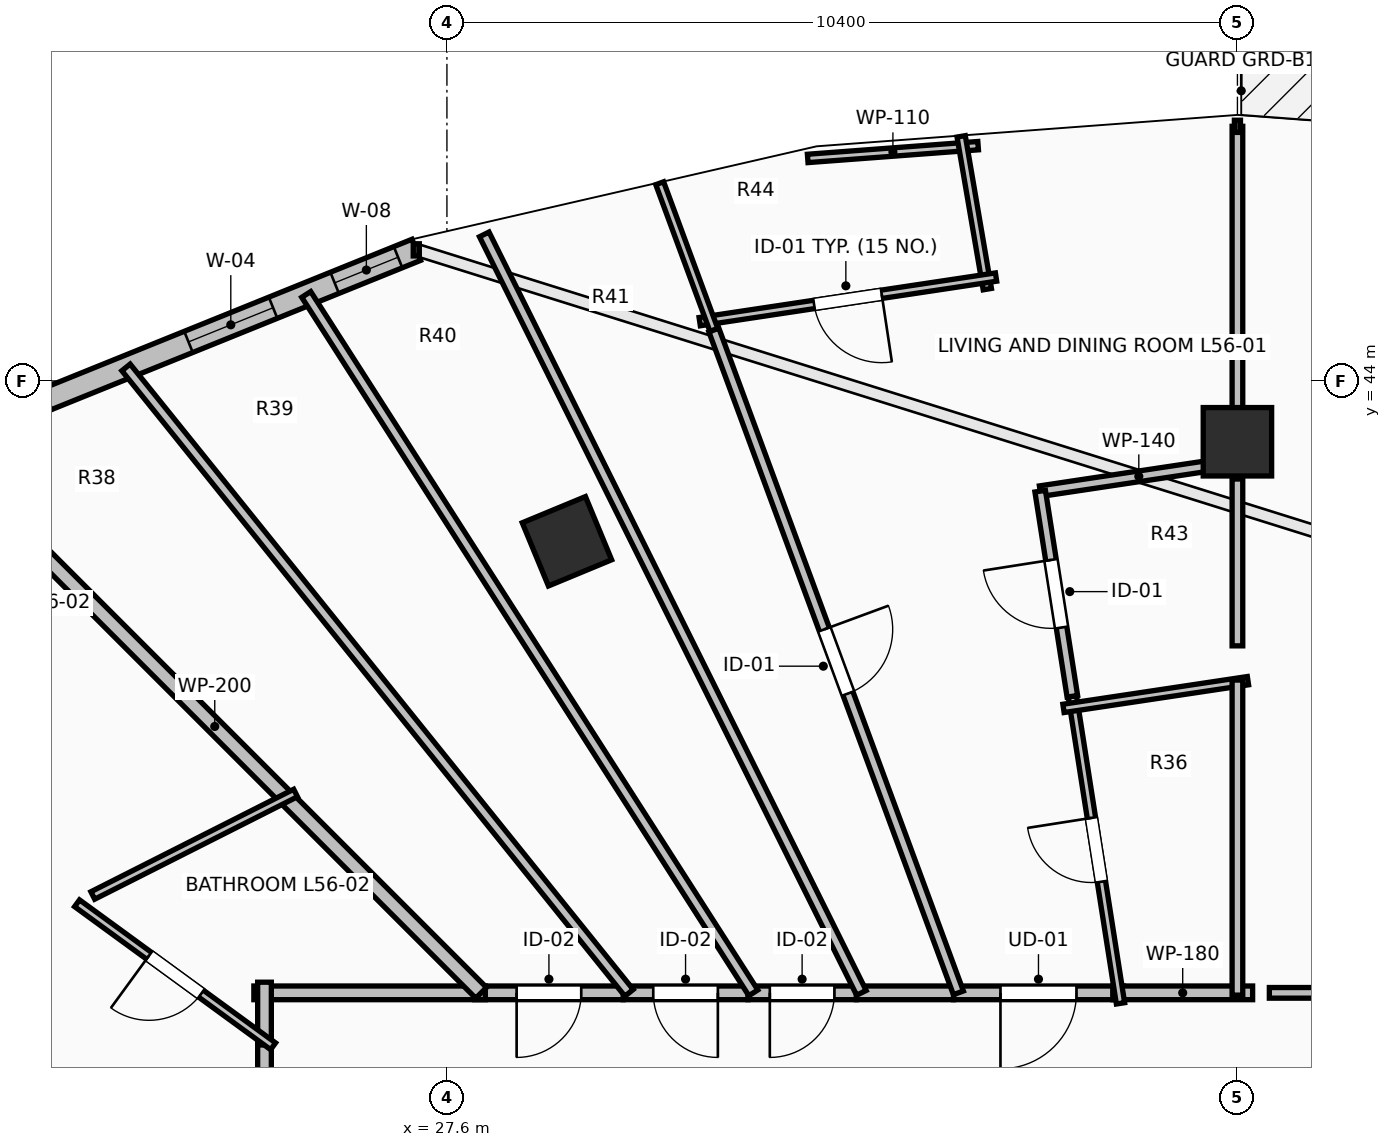
"""IFC4 building model, lengths in metres.
Left out: names, types, materials, properties, quantities, classifications, styles, units other than length and angle.
Written with IfcOpenShell. Run it as: python <this file> out.ifc"""

import sys

from ifc_helpers import new_model, si_unit, direction, frame, frame_2d, origin, origin_2d, place, context, subcontext, project, spatial, rectangle, extrude, element, fill, save


model = new_model("IFC4")
c1 = context("Model", 3, precision=1e-05, world=origin(), true_north=direction((0.0, 1.0)))
c2 = subcontext(c1, "Body", "Model", "MODEL_VIEW")
j1 = project(units=[si_unit("LENGTHUNIT", "METRE"), si_unit("PLANEANGLEUNIT", "RADIAN")], contexts=[c1])
p1 = place(None, origin())
s1 = spatial("IfcSite", under=j1, at=p1, CompositionType="ELEMENT")
p2 = place(p1, origin())
s2 = spatial("IfcBuilding", under=s1, at=p2, CompositionType="ELEMENT")
p3 = place(p2, frame((0.0, 0.0, 207.2)))
s3 = spatial("IfcBuildingStorey", under=s2, at=p3, CompositionType="ELEMENT", Elevation=207.2)
for number, where, z_axis, x_axis in (
    (1, (38.0, 43.2, 0.0), (0.0, 0.0, 1.0), (0.0, 1.0, 0.0)),
    (2, (29.179, 41.891, 0.0), (0.0, 0.0, 1.0), (-0.383, 0.924, 0.0)),
):
    element("IfcColumn", number, at=place(p3, frame(where, z_axis=z_axis, x_axis=x_axis)), inside=s3, PredefinedType="COLUMN", context=c2, shape_type="SweptSolid", body=[
        extrude(rectangle(XDim=0.9, YDim=0.9, at=origin_2d()), origin(), (0.0, 0.0, 1.0), 3.55),
    ])
p4 = place(p3, frame((27.197, 45.725, 0.0), z_axis=(0.0, 0.0, 1.0), x_axis=(-0.927111094334, -0.374786630981, 0.0)))
e3 = element("IfcWall", 3, at=p4, inside=s3, PredefinedType="STANDARD", context=c2, shape_type="SweptSolid", body=[
    extrude(rectangle(XDim=5.264, YDim=0.3, at=frame_2d((2.632, 0.0))), origin(), (0.0, 0.0, 1.0), 3.29),
])
p5 = place(p4, frame((0.258, 0.0, 0.85)))
e4 = element("IfcOpeningElement", 4, at=p5, cuts=e3, PredefinedType="OPENING", context=c2, shape_type="SweptSolid", body=[
    extrude(rectangle(XDim=0.9, YDim=1.8, at=frame_2d((0.45, 0.9))), frame((0.0, 0.165, 0.0), z_axis=(0.0, -1.0, 0.0), x_axis=(1.0, 0.0, 0.0)), (0.0, 0.0, 1.0), 0.33),
])
p6 = place(p4, frame((2.032, 0.0, 0.85)))
e5 = element("IfcOpeningElement", 5, at=p6, cuts=e3, PredefinedType="OPENING", context=c2, shape_type="SweptSolid", body=[
    extrude(rectangle(XDim=1.2, YDim=1.95, at=frame_2d((0.6, 0.975))), frame((0.0, 0.165, 0.0), z_axis=(0.0, -1.0, 0.0), x_axis=(1.0, 0.0, 0.0)), (0.0, 0.0, 1.0), 0.33),
])
p7 = place(p3, frame((36.5, 35.95, 0.0), z_axis=(0.0, 0.0, 1.0), x_axis=(-1.0, 0.0, 0.0)))
e6 = element("IfcWall", 6, at=p7, inside=s3, PredefinedType="PARTITIONING", context=c2, shape_type="SweptSolid", body=[
    extrude(rectangle(XDim=2.235, YDim=0.18, at=frame_2d((1.118, 0.0))), origin(), (0.0, 0.0, 1.0), 3.29),
])
p8 = place(p7, frame((0.617, 0.0, 0.0)))
e7 = element("IfcOpeningElement", 7, at=p8, cuts=e6, PredefinedType="OPENING", context=c2, shape_type="SweptSolid", body=[
    extrude(rectangle(XDim=1.0, YDim=2.15, at=frame_2d((0.5, 1.075))), frame((0.0, 0.105, 0.0), z_axis=(0.0, -1.0, 0.0), x_axis=(1.0, 0.0, 0.0)), (0.0, 0.0, 1.0), 0.21),
])
p9 = place(p3, frame((38.2, 35.95, 0.0), z_axis=(0.0, 0.0, 1.0), x_axis=(-1.0, 0.0, 0.0)))
e8 = element("IfcWall", 8, at=p9, inside=s3, PredefinedType="PARTITIONING", context=c2, shape_type="SweptSolid", body=[
    extrude(rectangle(XDim=1.84, YDim=0.18, at=frame_2d((0.92, 0.0))), origin(), (0.0, 0.0, 1.0), 3.29),
])
p10 = place(p3, frame((34.265, 35.95, 0.0), z_axis=(0.0, 0.0, 1.0), x_axis=(-1.0, 0.0, 0.0)))
e9 = element("IfcWall", 9, at=p10, inside=s3, PredefinedType="PARTITIONING", context=c2, shape_type="SweptSolid", body=[
    extrude(rectangle(XDim=1.279, YDim=0.18, at=frame_2d((0.639, 0.0))), origin(), (0.0, 0.0, 1.0), 3.29),
])
p11 = place(p3, frame((32.986, 35.95, 0.0), z_axis=(0.0, 0.0, 1.0), x_axis=(-1.0, 0.0, 0.0)))
e10 = element("IfcWall", 10, at=p11, inside=s3, PredefinedType="PARTITIONING", context=c2, shape_type="SweptSolid", body=[
    extrude(rectangle(XDim=1.426, YDim=0.18, at=frame_2d((0.713, 0.0))), origin(), (0.0, 0.0, 1.0), 3.29),
])
p12 = place(p11, frame((0.288, 0.0, 0.0)))
e11 = element("IfcOpeningElement", 11, at=p12, cuts=e10, PredefinedType="OPENING", context=c2, shape_type="SweptSolid", body=[
    extrude(rectangle(XDim=0.85, YDim=2.1, at=frame_2d((0.425, 1.05))), frame((0.0, 0.105, 0.0), z_axis=(0.0, -1.0, 0.0), x_axis=(1.0, 0.0, 0.0)), (0.0, 0.0, 1.0), 0.21),
])
p13 = place(p3, frame((31.56, 35.95, 0.0), z_axis=(0.0, 0.0, 1.0), x_axis=(-1.0, 0.0, 0.0)))
e12 = element("IfcWall", 12, at=p13, inside=s3, PredefinedType="PARTITIONING", context=c2, shape_type="SweptSolid", body=[
    extrude(rectangle(XDim=1.641, YDim=0.18, at=frame_2d((0.821, 0.0))), origin(), (0.0, 0.0, 1.0), 2.482),
])
p14 = place(p13, frame((0.396, 0.0, 0.0)))
e13 = element("IfcOpeningElement", 13, at=p14, cuts=e12, PredefinedType="OPENING", context=c2, shape_type="SweptSolid", body=[
    extrude(rectangle(XDim=0.85, YDim=2.1, at=frame_2d((0.425, 1.05))), frame((0.0, 0.105, 0.0), z_axis=(0.0, -1.0, 0.0), x_axis=(1.0, 0.0, 0.0)), (0.0, 0.0, 1.0), 0.21),
])
p15 = place(p3, frame((29.919, 35.95, 0.0), z_axis=(0.0, 0.0, 1.0), x_axis=(-1.0, 0.0, 0.0)))
e14 = element("IfcWall", 14, at=p15, inside=s3, PredefinedType="PARTITIONING", context=c2, shape_type="SweptSolid", body=[
    extrude(rectangle(XDim=1.954, YDim=0.18, at=frame_2d((0.977, 0.0))), origin(), (0.0, 0.0, 1.0), 2.482),
])
p16 = place(p15, frame((0.552, 0.0, 0.0)))
e15 = element("IfcOpeningElement", 15, at=p16, cuts=e14, PredefinedType="OPENING", context=c2, shape_type="SweptSolid", body=[
    extrude(rectangle(XDim=0.85, YDim=2.1, at=frame_2d((0.425, 1.05))), frame((0.0, 0.105, 0.0), z_axis=(0.0, -1.0, 0.0), x_axis=(1.0, 0.0, 0.0)), (0.0, 0.0, 1.0), 0.21),
])
p17 = place(p3, frame((25.2, 35.404, 0.0), z_axis=(0.0, 0.0, 1.0), x_axis=(0.0, -1.0, 0.0)))
e16 = element("IfcWall", 16, at=p17, inside=s3, PredefinedType="PARTITIONING", context=c2, shape_type="SweptSolid", body=[
    extrude(rectangle(XDim=3.563, YDim=0.18, at=frame_2d((1.781, 0.0))), origin(), (0.0, 0.0, 1.0), 2.482),
])
p18 = place(p17, frame((1.281, 0.0, 0.0)))
e17 = element("IfcOpeningElement", 17, at=p18, cuts=e16, PredefinedType="OPENING", context=c2, shape_type="SweptSolid", body=[
    extrude(rectangle(XDim=1.0, YDim=2.15, at=frame_2d((0.5, 1.075))), frame((0.0, 0.105, 0.0), z_axis=(0.0, -1.0, 0.0), x_axis=(1.0, 0.0, 0.0)), (0.0, 0.0, 1.0), 0.21),
])
p19 = place(p3, frame((28.105, 35.95, 0.0), z_axis=(0.0, 0.0, 1.0), x_axis=(-1.0, 0.0, 0.0)))
e18 = element("IfcWall", 18, at=p19, inside=s3, PredefinedType="PARTITIONING", context=c2, shape_type="SweptSolid", body=[
    extrude(rectangle(XDim=3.045, YDim=0.18, at=frame_2d((1.522, 0.0))), origin(), (0.0, 0.0, 1.0), 2.482),
])
p20 = place(p3, frame((25.2, 36.09, 0.0), z_axis=(0.0, 0.0, 1.0), x_axis=(0.0, -1.0, 0.0)))
e19 = element("IfcWall", 19, at=p20, inside=s3, PredefinedType="PARTITIONING", context=c2, shape_type="SweptSolid", body=[
    extrude(rectangle(XDim=0.826, YDim=0.18, at=frame_2d((0.413, 0.0))), origin(), (0.0, 0.0, 1.0), 2.482),
])
p21 = place(p3, frame((36.462, 35.812, 0.0), z_axis=(0.0, 0.0, 1.0), x_axis=(-0.154883213323, 0.987932786292, 0.0)))
e20 = element("IfcWall", 20, at=p21, inside=s3, PredefinedType="PARTITIONING", context=c2, shape_type="SweptSolid", body=[
    extrude(rectangle(XDim=4.089, YDim=0.11, at=frame_2d((2.044, 0.0))), origin(), (0.0, 0.0, 1.0), 2.936),
])
p22 = place(p21, frame((1.619, 0.0, 0.0)))
e21 = element("IfcOpeningElement", 21, at=p22, cuts=e20, PredefinedType="OPENING", context=c2, shape_type="SweptSolid", body=[
    extrude(rectangle(XDim=0.85, YDim=2.1, at=frame_2d((0.425, 1.05))), frame((0.0, 0.07, 0.0), z_axis=(0.0, -1.0, 0.0), x_axis=(1.0, 0.0, 0.0)), (0.0, 0.0, 1.0), 0.14),
])
p23 = place(p3, frame((34.589, 47.095, 0.0), z_axis=(0.0, 0.0, 1.0), x_axis=(-0.997205784552, -0.074703569226, 0.0)))
e22 = element("IfcWall", 22, at=p23, inside=s3, PredefinedType="PARTITIONING", context=c2, shape_type="SweptSolid", body=[
    extrude(rectangle(XDim=2.249, YDim=0.11, at=frame_2d((1.124, 0.0))), origin(), (0.0, 0.0, 1.0), 3.29),
])
p24 = place(p3, frame((34.365, 47.218, 0.0), z_axis=(0.0, 0.0, 1.0), x_axis=(0.168804313657, -0.985649584635, 0.0)))
e23 = element("IfcWall", 23, at=p24, inside=s3, PredefinedType="PARTITIONING", context=c2, shape_type="SweptSolid", body=[
    extrude(rectangle(XDim=2.039, YDim=0.11, at=frame_2d((1.02, 0.0))), origin(), (0.0, 0.0, 1.0), 3.29),
])
p25 = place(p3, frame((34.824, 45.367, 0.0), z_axis=(0.0, 0.0, 1.0), x_axis=(-0.988877230123, -0.148734070555, 0.0)))
e24 = element("IfcWall", 24, at=p25, inside=s3, PredefinedType="PARTITIONING", context=c2, shape_type="SweptSolid", body=[
    extrude(rectangle(XDim=3.943, YDim=0.11, at=frame_2d((1.971, 0.0))), origin(), (0.0, 0.0, 1.0), 3.29),
])
p26 = place(p25, frame((1.521, 0.0, 0.0)))
e25 = element("IfcOpeningElement", 25, at=p26, cuts=e24, PredefinedType="OPENING", context=c2, shape_type="SweptSolid", body=[
    extrude(rectangle(XDim=0.9, YDim=2.1, at=frame_2d((0.45, 1.05))), frame((0.0, 0.07, 0.0), z_axis=(0.0, -1.0, 0.0), x_axis=(1.0, 0.0, 0.0)), (0.0, 0.0, 1.0), 0.14),
])
p27 = place(p3, frame((31.113, 44.67, 0.0), z_axis=(0.0, 0.0, 1.0), x_axis=(-0.346337161188, 0.938110105894, 0.0)))
e26 = element("IfcWall", 26, at=p27, inside=s3, PredefinedType="PARTITIONING", context=c2, shape_type="SweptSolid", body=[
    extrude(rectangle(XDim=2.059, YDim=0.11, at=frame_2d((1.03, 0.0))), origin(), (0.0, 0.0, 1.0), 3.29),
])
p28 = place(p3, frame((35.405, 42.55, 0.0), z_axis=(0.0, 0.0, 1.0), x_axis=(0.988900154693, 0.148581573718, 0.0)))
e27 = element("IfcWall", 27, at=p28, inside=s3, PredefinedType="PARTITIONING", context=c2, shape_type="SweptSolid", body=[
    extrude(rectangle(XDim=2.624, YDim=0.14, at=frame_2d((1.312, 0.0))), origin(), (0.0, 0.0, 1.0), 2.482),
])
p29 = place(p3, frame((35.828, 39.851, 0.0), z_axis=(0.0, 0.0, 1.0), x_axis=(-0.154971189464, 0.987918989814, 0.0)))
e28 = element("IfcWall", 28, at=p29, inside=s3, PredefinedType="PARTITIONING", context=c2, shape_type="SweptSolid", body=[
    extrude(rectangle(XDim=2.732, YDim=0.14, at=frame_2d((1.366, 0.0))), origin(), (0.0, 0.0, 1.0), 2.482),
])
p30 = place(p29, frame((0.916, 0.0, 0.0)))
e29 = element("IfcOpeningElement", 29, at=p30, cuts=e28, PredefinedType="OPENING", context=c2, shape_type="SweptSolid", body=[
    extrude(rectangle(XDim=0.9, YDim=2.1, at=frame_2d((0.45, 1.05))), frame((0.0, 0.085, 0.0), z_axis=(0.0, -1.0, 0.0), x_axis=(1.0, 0.0, 0.0)), (0.0, 0.0, 1.0), 0.17),
])
p31 = place(p3, frame((31.112, 44.67, 0.0), z_axis=(0.0, 0.0, 1.0), x_axis=(0.346109472243, -0.938194134081, 0.0)))
e30 = element("IfcWall", 30, at=p31, inside=s3, PredefinedType="PARTITIONING", context=c2, shape_type="SweptSolid", body=[
    extrude(rectangle(XDim=9.294, YDim=0.14, at=frame_2d((4.647, 0.0))), origin(), (0.0, 0.0, 1.0), 2.482),
])
p32 = place(p31, frame((4.197, 0.0, 0.0)))
e31 = element("IfcOpeningElement", 31, at=p32, cuts=e30, PredefinedType="OPENING", context=c2, shape_type="SweptSolid", body=[
    extrude(rectangle(XDim=0.9, YDim=2.1, at=frame_2d((0.45, 1.05))), frame((0.0, 0.085, 0.0), z_axis=(0.0, -1.0, 0.0), x_axis=(1.0, 0.0, 0.0)), (0.0, 0.0, 1.0), 0.17),
])
p33 = place(p3, frame((38.138, 40.057, 0.0), z_axis=(0.0, 0.0, 1.0), x_axis=(-0.988892526147, -0.148632337431, 0.0)))
e32 = element("IfcWall", 32, at=p33, inside=s3, PredefinedType="PARTITIONING", context=c2, shape_type="SweptSolid", body=[
    extrude(rectangle(XDim=2.454, YDim=0.11, at=frame_2d((1.227, 0.0))), origin(), (0.0, 0.0, 1.0), 3.022),
])
p34 = place(p3, frame((28.091, 45.928, 0.0), z_axis=(0.0, 0.0, 1.0), x_axis=(0.445267068418, -0.895397809793, 0.0)))
e33 = element("IfcWall", 33, at=p34, inside=s3, PredefinedType="PARTITIONING", context=c2, shape_type="SweptSolid", body=[
    extrude(rectangle(XDim=11.144, YDim=0.14, at=frame_2d((5.572, 0.0))), origin(), (0.0, 0.0, 1.0), 2.482),
])
p35 = place(p3, frame((25.749, 45.138, 0.0), z_axis=(0.0, 0.0, 1.0), x_axis=(0.539168632786, -0.842197830335, 0.0)))
e34 = element("IfcWall", 34, at=p35, inside=s3, PredefinedType="PARTITIONING", context=c2, shape_type="SweptSolid", body=[
    extrude(rectangle(XDim=10.909, YDim=0.14, at=frame_2d((5.455, 0.0))), origin(), (0.0, 0.0, 1.0), 2.482),
])
p36 = place(p3, frame((23.378, 44.178, 0.0), z_axis=(0.0, 0.0, 1.0), x_axis=(0.626756813732, -0.779214923137, 0.0)))
e35 = element("IfcWall", 35, at=p36, inside=s3, PredefinedType="PARTITIONING", context=c2, shape_type="SweptSolid", body=[
    extrude(rectangle(XDim=10.559, YDim=0.14, at=frame_2d((5.28, 0.0))), origin(), (0.0, 0.0, 1.0), 2.482),
])
p37 = place(p3, frame((21.041, 42.959, 0.0), z_axis=(0.0, 0.0, 1.0), x_axis=(0.707106781187, -0.707106781187, 0.0)))
e36 = element("IfcWall", 36, at=p37, inside=s3, PredefinedType="PARTITIONING", context=c2, shape_type="SweptSolid", body=[
    extrude(rectangle(XDim=9.912, YDim=0.2, at=frame_2d((4.956, 0.0))), origin(), (0.0, 0.0, 1.0), 2.482),
])
p38 = place(p3, frame((25.313, 35.248, 0.0), z_axis=(0.0, 0.0, 1.0), x_axis=(-0.807968083988, 0.58922625133, 0.0)))
e37 = element("IfcWall", 37, at=p38, inside=s3, PredefinedType="PARTITIONING", context=c2, shape_type="SweptSolid", body=[
    extrude(rectangle(XDim=3.192, YDim=0.11, at=frame_2d((1.596, 0.0))), origin(), (0.0, 0.0, 1.0), 2.482),
])
p39 = place(p38, frame((1.171, 0.0, 0.0)))
e38 = element("IfcOpeningElement", 38, at=p39, cuts=e37, PredefinedType="OPENING", context=c2, shape_type="SweptSolid", body=[
    extrude(rectangle(XDim=0.85, YDim=2.1, at=frame_2d((0.425, 1.05))), frame((0.0, 0.07, 0.0), z_axis=(0.0, -1.0, 0.0), x_axis=(1.0, 0.0, 0.0)), (0.0, 0.0, 1.0), 0.14),
])
p40 = place(p3, frame((22.941, 37.231, 0.0), z_axis=(0.0, 0.0, 1.0), x_axis=(0.892507731149, 0.451032094024, 0.0)))
e39 = element("IfcWall", 39, at=p40, inside=s3, PredefinedType="PARTITIONING", context=c2, shape_type="SweptSolid", body=[
    extrude(rectangle(XDim=2.989, YDim=0.11, at=frame_2d((1.495, 0.0))), origin(), (0.0, 0.0, 1.0), 2.482),
])
p41 = place(p3, frame((18.152, 35.15, 0.0), z_axis=(0.0, 0.0, 1.0), x_axis=(0.908152637685, -0.418639208227, 0.0)))
e40 = element("IfcWall", 40, at=p41, inside=s3, PredefinedType="PARTITIONING", context=c2, shape_type="SweptSolid", body=[
    extrude(rectangle(XDim=7.761, YDim=0.14, at=frame_2d((3.88, 0.0))), origin(), (0.0, 0.0, 1.0), 2.824),
])
p42 = place(p41, frame((3.43, 0.0, 0.0)))
e41 = element("IfcOpeningElement", 41, at=p42, cuts=e40, PredefinedType="OPENING", context=c2, shape_type="SweptSolid", body=[
    extrude(rectangle(XDim=0.9, YDim=2.1, at=frame_2d((0.45, 1.05))), frame((0.0, 0.085, 0.0), z_axis=(0.0, -1.0, 0.0), x_axis=(1.0, 0.0, 0.0)), (0.0, 0.0, 1.0), 0.17),
])
p43 = place(p3, frame((12.609, 35.141, 0.0), z_axis=(0.0, 0.0, 1.0), x_axis=(0.940877411069, -0.338747246985, 0.0)))
e42 = element("IfcWall", 42, at=p43, inside=s3, PredefinedType="PARTITIONING", context=c2, shape_type="SweptSolid", body=[
    extrude(rectangle(XDim=13.382, YDim=0.14, at=frame_2d((6.691, 0.0))), origin(), (0.0, 0.0, 1.0), 2.824),
])
p44 = place(p43, frame((6.266, 0.0, 0.0)))
e43 = element("IfcOpeningElement", 43, at=p44, cuts=e42, PredefinedType="OPENING", context=c2, shape_type="SweptSolid", body=[
    extrude(rectangle(XDim=0.85, YDim=2.1, at=frame_2d((0.425, 1.05))), frame((0.0, 0.085, 0.0), z_axis=(0.0, -1.0, 0.0), x_axis=(1.0, 0.0, 0.0)), (0.0, 0.0, 1.0), 0.17),
])
p45 = place(p3, frame((47.67, 35.95, 0.0), z_axis=(0.0, 0.0, 1.0), x_axis=(-1.0, 0.0, 0.0)))
e44 = element("IfcWall", 44, at=p45, inside=s3, PredefinedType="PARTITIONING", context=c2, shape_type="SweptSolid", body=[
    extrude(rectangle(XDim=9.25, YDim=0.14, at=frame_2d((4.625, 0.0))), origin(), (0.0, 0.0, 1.0), 2.936),
])
p46 = place(p3, frame((38.0, 43.16, 0.0), z_axis=(0.0, 0.0, 1.0), x_axis=(0.0, 1.0, 0.0)))
e45 = element("IfcWall", 45, at=p46, inside=s3, PredefinedType="PARTITIONING", context=c2, shape_type="SweptSolid", body=[
    extrude(rectangle(XDim=4.19, YDim=0.14, at=frame_2d((2.095, 0.0))), origin(), (0.0, 0.0, 1.0), 3.29),
])
p47 = place(p3, frame((38.0, 35.92, 0.0), z_axis=(0.0, 0.0, 1.0), x_axis=(0.0, 1.0, 0.0)))
e46 = element("IfcWall", 46, at=p47, inside=s3, PredefinedType="PARTITIONING", context=c2, shape_type="SweptSolid", body=[
    extrude(rectangle(XDim=4.145, YDim=0.14, at=frame_2d((2.073, 0.0))), origin(), (0.0, 0.0, 1.0), 2.936),
])
p48 = place(p3, frame((38.0, 40.515, 0.0), z_axis=(0.0, 0.0, 1.0), x_axis=(0.0, 1.0, 0.0)))
e47 = element("IfcWall", 47, at=p48, inside=s3, PredefinedType="PARTITIONING", context=c2, shape_type="SweptSolid", body=[
    extrude(rectangle(XDim=2.195, YDim=0.14, at=frame_2d((1.098, 0.0))), origin(), (0.0, 0.0, 1.0), 3.29),
])
p49 = place(p5, origin())
e48 = element("IfcWindow", 48, at=p49, inside=s3, PartitioningType="SINGLE_PANEL", PredefinedType="WINDOW", context=c2, shape_type="SweptSolid", body=[
    extrude(rectangle(XDim=0.9, YDim=1.8, at=frame_2d((0.45, 0.9))), frame((0.0, 0.03, 0.0), z_axis=(0.0, -1.0, 0.0), x_axis=(1.0, 0.0, 0.0)), (0.0, 0.0, 1.0), 0.06),
])
fill(e4, e48)
p50 = place(p6, origin())
e49 = element("IfcWindow", 49, at=p50, inside=s3, PartitioningType="SINGLE_PANEL", PredefinedType="WINDOW", context=c2, shape_type="SweptSolid", body=[
    extrude(rectangle(XDim=1.2, YDim=1.95, at=frame_2d((0.6, 0.975))), frame((0.0, 0.03, 0.0), z_axis=(0.0, -1.0, 0.0), x_axis=(1.0, 0.0, 0.0)), (0.0, 0.0, 1.0), 0.06),
])
fill(e5, e49)
p51 = place(p8, origin())
e50 = element("IfcDoor", 50, at=p51, inside=s3, OperationType="SINGLE_SWING_RIGHT", PredefinedType="DOOR", context=c2, shape_type="SweptSolid", body=[
    extrude(rectangle(XDim=1.0, YDim=2.15, at=frame_2d((0.5, 1.075))), frame((0.0, 0.025, 0.0), z_axis=(0.0, -1.0, 0.0), x_axis=(1.0, 0.0, 0.0)), (0.0, 0.0, 1.0), 0.05),
])
fill(e7, e50)
p52 = place(p22, origin())
e51 = element("IfcDoor", 51, at=p52, inside=s3, OperationType="SINGLE_SWING_RIGHT", PredefinedType="DOOR", context=c2, shape_type="SweptSolid", body=[
    extrude(rectangle(XDim=0.85, YDim=2.1, at=frame_2d((0.425, 1.05))), frame((0.0, 0.025, 0.0), z_axis=(0.0, -1.0, 0.0), x_axis=(1.0, 0.0, 0.0)), (0.0, 0.0, 1.0), 0.05),
])
fill(e21, e51)
p53 = place(p26, origin())
e52 = element("IfcDoor", 52, at=p53, inside=s3, OperationType="SINGLE_SWING_LEFT", PredefinedType="DOOR", context=c2, shape_type="SweptSolid", body=[
    extrude(rectangle(XDim=0.9, YDim=2.1, at=frame_2d((0.45, 1.05))), frame((0.0, 0.025, 0.0), z_axis=(0.0, -1.0, 0.0), x_axis=(1.0, 0.0, 0.0)), (0.0, 0.0, 1.0), 0.05),
])
fill(e25, e52)
p54 = place(p30, origin())
e53 = element("IfcDoor", 53, at=p54, inside=s3, OperationType="SINGLE_SWING_RIGHT", PredefinedType="DOOR", context=c2, shape_type="SweptSolid", body=[
    extrude(rectangle(XDim=0.9, YDim=2.1, at=frame_2d((0.45, 1.05))), frame((0.0, 0.025, 0.0), z_axis=(0.0, -1.0, 0.0), x_axis=(1.0, 0.0, 0.0)), (0.0, 0.0, 1.0), 0.05),
])
fill(e29, e53)
p55 = place(p32, origin())
e54 = element("IfcDoor", 54, at=p55, inside=s3, OperationType="SINGLE_SWING_LEFT", PredefinedType="DOOR", context=c2, shape_type="SweptSolid", body=[
    extrude(rectangle(XDim=0.9, YDim=2.1, at=frame_2d((0.45, 1.05))), frame((0.0, 0.025, 0.0), z_axis=(0.0, -1.0, 0.0), x_axis=(1.0, 0.0, 0.0)), (0.0, 0.0, 1.0), 0.05),
])
fill(e31, e54)
p56 = place(p39, origin())
e55 = element("IfcDoor", 55, at=p56, inside=s3, OperationType="SINGLE_SWING_RIGHT", PredefinedType="DOOR", context=c2, shape_type="SweptSolid", body=[
    extrude(rectangle(XDim=0.85, YDim=2.1, at=frame_2d((0.425, 1.05))), frame((0.0, 0.025, 0.0), z_axis=(0.0, -1.0, 0.0), x_axis=(1.0, 0.0, 0.0)), (0.0, 0.0, 1.0), 0.05),
])
fill(e38, e55)
p57 = place(p12, origin())
e56 = element("IfcDoor", 56, at=p57, inside=s3, OperationType="SINGLE_SWING_RIGHT", PredefinedType="DOOR", context=c2, shape_type="SweptSolid", body=[
    extrude(rectangle(XDim=0.85, YDim=2.1, at=frame_2d((0.425, 1.05))), frame((0.0, 0.025, 0.0), z_axis=(0.0, -1.0, 0.0), x_axis=(1.0, 0.0, 0.0)), (0.0, 0.0, 1.0), 0.05),
])
fill(e11, e56)
p58 = place(p14, origin())
e57 = element("IfcDoor", 57, at=p58, inside=s3, OperationType="SINGLE_SWING_LEFT", PredefinedType="DOOR", context=c2, shape_type="SweptSolid", body=[
    extrude(rectangle(XDim=0.85, YDim=2.1, at=frame_2d((0.425, 1.05))), frame((0.0, 0.025, 0.0), z_axis=(0.0, -1.0, 0.0), x_axis=(1.0, 0.0, 0.0)), (0.0, 0.0, 1.0), 0.05),
])
fill(e13, e57)
p59 = place(p16, origin())
e58 = element("IfcDoor", 58, at=p59, inside=s3, OperationType="SINGLE_SWING_RIGHT", PredefinedType="DOOR", context=c2, shape_type="SweptSolid", body=[
    extrude(rectangle(XDim=0.85, YDim=2.1, at=frame_2d((0.425, 1.05))), frame((0.0, 0.025, 0.0), z_axis=(0.0, -1.0, 0.0), x_axis=(1.0, 0.0, 0.0)), (0.0, 0.0, 1.0), 0.05),
])
fill(e15, e58)
save(model, sys.argv[1])
